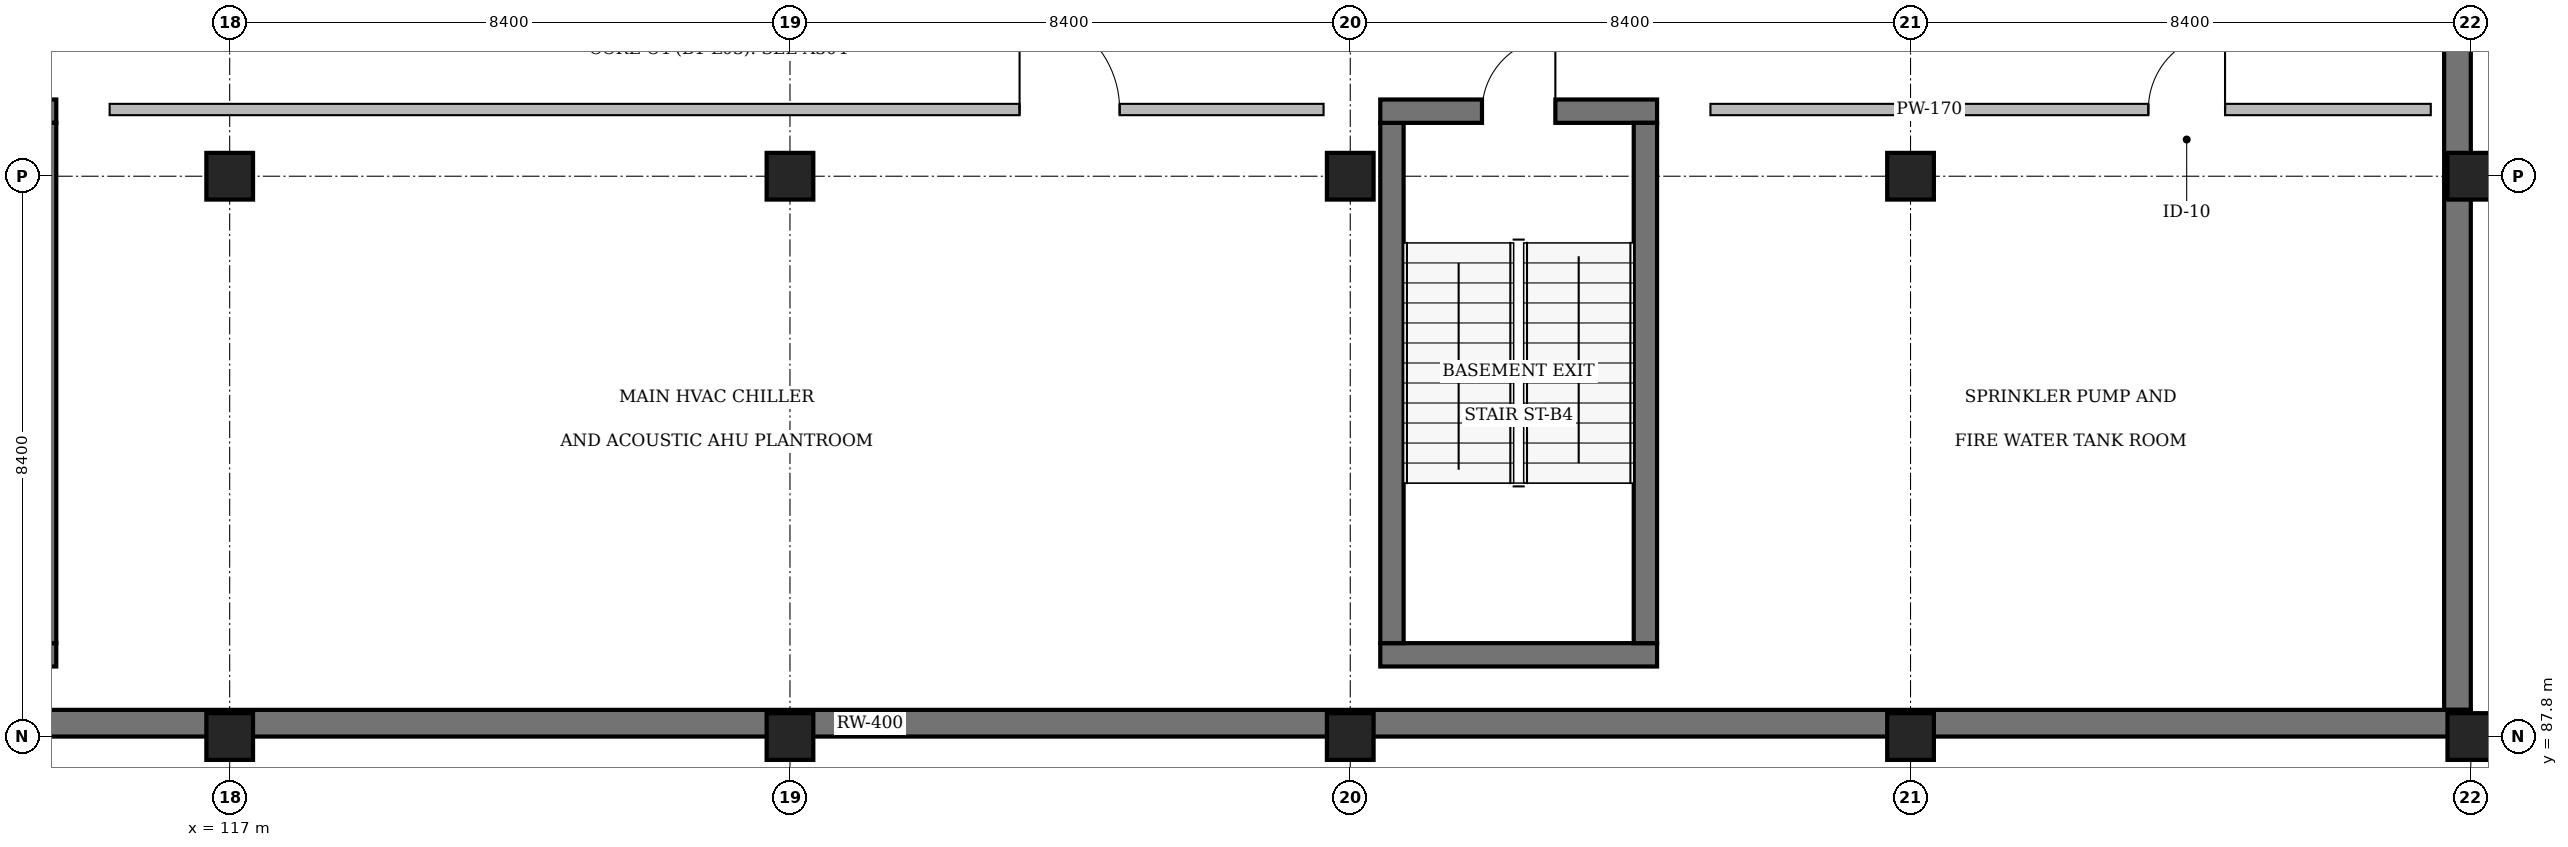
"""IFC4 building model, lengths in metres.
Left out: names, types, materials, properties, quantities, classifications, styles, units other than length and angle.
Written with IfcOpenShell. Run it as: python <this file> out.ifc"""

import sys

from ifc_helpers import new_model, si_unit, direction, frame, frame_2d, origin, origin_2d, place, context, subcontext, project, spatial, rectangle, extrude, element, fill, save


model = new_model("IFC4")
c1 = context("Model", 3, precision=1e-05, world=origin(), true_north=direction((0.0, 1.0)))
c2 = subcontext(c1, "Body", "Model", "MODEL_VIEW")
j1 = project(units=[si_unit("LENGTHUNIT", "METRE"), si_unit("PLANEANGLEUNIT", "RADIAN")], contexts=[c1])
p1 = place(None, origin())
s1 = spatial("IfcSite", under=j1, at=p1, CompositionType="ELEMENT")
p2 = place(p1, origin())
s2 = spatial("IfcBuilding", under=s1, at=p2, CompositionType="ELEMENT")
p3 = place(p2, frame((0.0, 0.0, -4.8)))
s3 = spatial("IfcBuildingStorey", under=s2, at=p3, CompositionType="ELEMENT", Elevation=-4.8)
for number, where, z_axis, x_axis in (
    (1, (117.0, 87.8, 0.0), (0.0, 0.0, 1.0), (1.0, 0.0, 0.0)),
    (2, (117.0, 96.2, 0.0), (0.0, 0.0, 1.0), (1.0, 0.0, 0.0)),
    (3, (125.4, 87.8, 0.0), (0.0, 0.0, 1.0), (1.0, 0.0, 0.0)),
    (4, (125.4, 96.2, 0.0), (0.0, 0.0, 1.0), (1.0, 0.0, 0.0)),
    (5, (133.8, 87.8, 0.0), (0.0, 0.0, 1.0), (1.0, 0.0, 0.0)),
    (6, (133.8, 96.2, 0.0), (0.0, 0.0, 1.0), (1.0, 0.0, 0.0)),
    (7, (142.2, 87.8, 0.0), (0.0, 0.0, 1.0), (1.0, 0.0, 0.0)),
    (8, (142.2, 96.2, 0.0), (0.0, 0.0, 1.0), (1.0, 0.0, 0.0)),
    (9, (150.6, 87.8, 0.0), (0.0, 0.0, 1.0), (1.0, 0.0, 0.0)),
    (10, (150.6, 96.2, 0.0), (0.0, 0.0, 1.0), (1.0, 0.0, 0.0)),
):
    element("IfcColumn", number, at=place(p3, frame(where, z_axis=z_axis, x_axis=x_axis)), inside=s3, PredefinedType="COLUMN", context=c2, shape_type="SweptSolid", body=[
        extrude(rectangle(XDim=0.7, YDim=0.7, at=origin_2d()), origin(), (0.0, 0.0, 1.0), 4.8),
    ])
for number, where, z_axis, x_axis in (
    (11, (114.4, 89.025, 0.0), (0.0, 0.0, 1.0), (-1.0, 0.0, 0.0)),
    (12, (110.25, 97.175, 0.0), (0.0, 0.0, 1.0), (1.0, 0.0, 0.0)),
):
    element("IfcWall", number, at=place(p3, frame(where, z_axis=z_axis, x_axis=x_axis)), inside=s3, PredefinedType="SOLIDWALL", context=c2, shape_type="SweptSolid", body=[
        extrude(rectangle(XDim=4.15, YDim=0.35, at=frame_2d((2.075, 0.0))), origin(), (0.0, 0.0, 1.0), 4.48),
    ])
p4 = place(p3, frame((114.225, 97.0, 0.0), z_axis=(0.0, 0.0, 1.0), x_axis=(0.0, -1.0, 0.0)))
e13 = element("IfcWall", 13, at=p4, inside=s3, PredefinedType="SOLIDWALL", context=c2, shape_type="SweptSolid", body=[
    extrude(rectangle(XDim=7.8, YDim=0.35, at=frame_2d((3.9, 0.0))), origin(), (0.0, 0.0, 1.0), 4.48),
])
p5 = place(p3, frame((138.4, 89.025, 0.0), z_axis=(0.0, 0.0, 1.0), x_axis=(-1.0, 0.0, 0.0)))
e14 = element("IfcWall", 14, at=p5, inside=s3, PredefinedType="SOLIDWALL", context=c2, shape_type="SweptSolid", body=[
    extrude(rectangle(XDim=4.15, YDim=0.35, at=frame_2d((2.075, 0.0))), origin(), (0.0, 0.0, 1.0), 4.56),
])
p6 = place(p3, frame((134.425, 89.2, 0.0), z_axis=(0.0, 0.0, 1.0), x_axis=(0.0, 1.0, 0.0)))
e15 = element("IfcWall", 15, at=p6, inside=s3, PredefinedType="SOLIDWALL", context=c2, shape_type="SweptSolid", body=[
    extrude(rectangle(XDim=7.8, YDim=0.35, at=frame_2d((3.9, 0.0))), origin(), (0.0, 0.0, 1.0), 4.56),
])
p7 = place(p3, frame((134.25, 97.175, 0.0), z_axis=(0.0, 0.0, 1.0), x_axis=(1.0, 0.0, 0.0)))
e16 = element("IfcWall", 16, at=p7, inside=s3, PredefinedType="SOLIDWALL", context=c2, shape_type="SweptSolid", body=[
    extrude(rectangle(XDim=4.15, YDim=0.35, at=frame_2d((2.075, 0.0))), origin(), (0.0, 0.0, 1.0), 4.56),
])
p8 = place(p7, frame((1.525, 0.0, 0.0)))
e17 = element("IfcOpeningElement", 17, at=p8, cuts=e16, PredefinedType="OPENING", context=c2, shape_type="SweptSolid", body=[
    extrude(rectangle(XDim=1.1, YDim=2.15, at=frame_2d((0.55, 1.075))), frame((0.0, 0.195, 0.0), z_axis=(0.0, -1.0, 0.0), x_axis=(1.0, 0.0, 0.0)), (0.0, 0.0, 1.0), 0.39),
])
p9 = place(p3, frame((138.225, 97.0, 0.0), z_axis=(0.0, 0.0, 1.0), x_axis=(0.0, -1.0, 0.0)))
e18 = element("IfcWall", 18, at=p9, inside=s3, PredefinedType="SOLIDWALL", context=c2, shape_type="SweptSolid", body=[
    extrude(rectangle(XDim=7.8, YDim=0.35, at=frame_2d((3.9, 0.0))), origin(), (0.0, 0.0, 1.0), 4.56),
])
p10 = place(p3, frame((150.4, 88.2, 0.0), z_axis=(0.0, 0.0, 1.0), x_axis=(0.0, 1.0, 0.0)))
e19 = element("IfcWall", 19, at=p10, inside=s3, PredefinedType="SOLIDWALL", context=c2, shape_type="SweptSolid", body=[
    extrude(rectangle(XDim=23.2, YDim=0.4, at=frame_2d((11.6, 0.0))), origin(), (0.0, 0.0, 1.0), 4.48),
])
p11 = place(p3, frame((102.6, 88.0, 0.0), z_axis=(0.0, 0.0, 1.0), x_axis=(1.0, 0.0, 0.0)))
e20 = element("IfcWall", 20, at=p11, inside=s3, PredefinedType="SOLIDWALL", context=c2, shape_type="SweptSolid", body=[
    extrude(rectangle(XDim=48.0, YDim=0.4, at=frame_2d((24.0, 0.0))), origin(), (0.0, 0.0, 1.0), 4.48),
])
p12 = place(p3, frame((115.2, 97.2, 0.0), z_axis=(0.0, 0.0, 1.0), x_axis=(1.0, 0.0, 0.0)))
e21 = element("IfcWall", 21, at=p12, inside=s3, PredefinedType="PARTITIONING", context=c2, shape_type="SweptSolid", body=[
    extrude(rectangle(XDim=18.2, YDim=0.17, at=frame_2d((9.1, 0.0))), origin(), (0.0, 0.0, 1.0), 4.48),
])
p13 = place(p12, frame((13.642, 0.0, 0.0)))
e22 = element("IfcOpeningElement", 22, at=p13, cuts=e21, PredefinedType="OPENING", context=c2, shape_type="SweptSolid", body=[
    extrude(rectangle(XDim=1.5, YDim=2.2, at=frame_2d((0.75, 1.1))), frame((0.0, 0.105, 0.0), z_axis=(0.0, -1.0, 0.0), x_axis=(1.0, 0.0, 0.0)), (0.0, 0.0, 1.0), 0.21),
])
p14 = place(p3, frame((139.2, 97.2, 0.0), z_axis=(0.0, 0.0, 1.0), x_axis=(1.0, 0.0, 0.0)))
e23 = element("IfcWall", 23, at=p14, inside=s3, PredefinedType="PARTITIONING", context=c2, shape_type="SweptSolid", body=[
    extrude(rectangle(XDim=10.8, YDim=0.17, at=frame_2d((5.4, 0.0))), origin(), (0.0, 0.0, 1.0), 4.48),
])
p15 = place(p14, frame((6.565, 0.0, 0.0)))
e24 = element("IfcOpeningElement", 24, at=p15, cuts=e23, PredefinedType="OPENING", context=c2, shape_type="SweptSolid", body=[
    extrude(rectangle(XDim=1.15, YDim=2.15, at=frame_2d((0.575, 1.075))), frame((0.0, 0.105, 0.0), z_axis=(0.0, -1.0, 0.0), x_axis=(1.0, 0.0, 0.0)), (0.0, 0.0, 1.0), 0.21),
])
p16 = place(p8, origin())
e25 = element("IfcDoor", 25, at=p16, inside=s3, OperationType="SINGLE_SWING_RIGHT", PredefinedType="DOOR", context=c2, shape_type="SweptSolid", body=[
    extrude(rectangle(XDim=1.1, YDim=2.15, at=frame_2d((0.55, 1.075))), frame((0.0, 0.025, 0.0), z_axis=(0.0, -1.0, 0.0), x_axis=(1.0, 0.0, 0.0)), (0.0, 0.0, 1.0), 0.05),
])
fill(e17, e25)
p17 = place(p13, origin())
e26 = element("IfcDoor", 26, at=p17, inside=s3, OperationType="DOUBLE_DOOR_SINGLE_SWING", PredefinedType="DOOR", context=c2, shape_type="SweptSolid", body=[
    extrude(rectangle(XDim=1.5, YDim=2.2, at=frame_2d((0.75, 1.1))), frame((0.0, 0.025, 0.0), z_axis=(0.0, -1.0, 0.0), x_axis=(1.0, 0.0, 0.0)), (0.0, 0.0, 1.0), 0.05),
])
fill(e22, e26)
p18 = place(p15, origin())
e27 = element("IfcDoor", 27, at=p18, inside=s3, OperationType="SINGLE_SWING_RIGHT", PredefinedType="DOOR", context=c2, shape_type="SweptSolid", body=[
    extrude(rectangle(XDim=1.15, YDim=2.15, at=frame_2d((0.575, 1.075))), frame((0.0, 0.025, 0.0), z_axis=(0.0, -1.0, 0.0), x_axis=(1.0, 0.0, 0.0)), (0.0, 0.0, 1.0), 0.05),
])
fill(e24, e27)
save(model, sys.argv[1])
